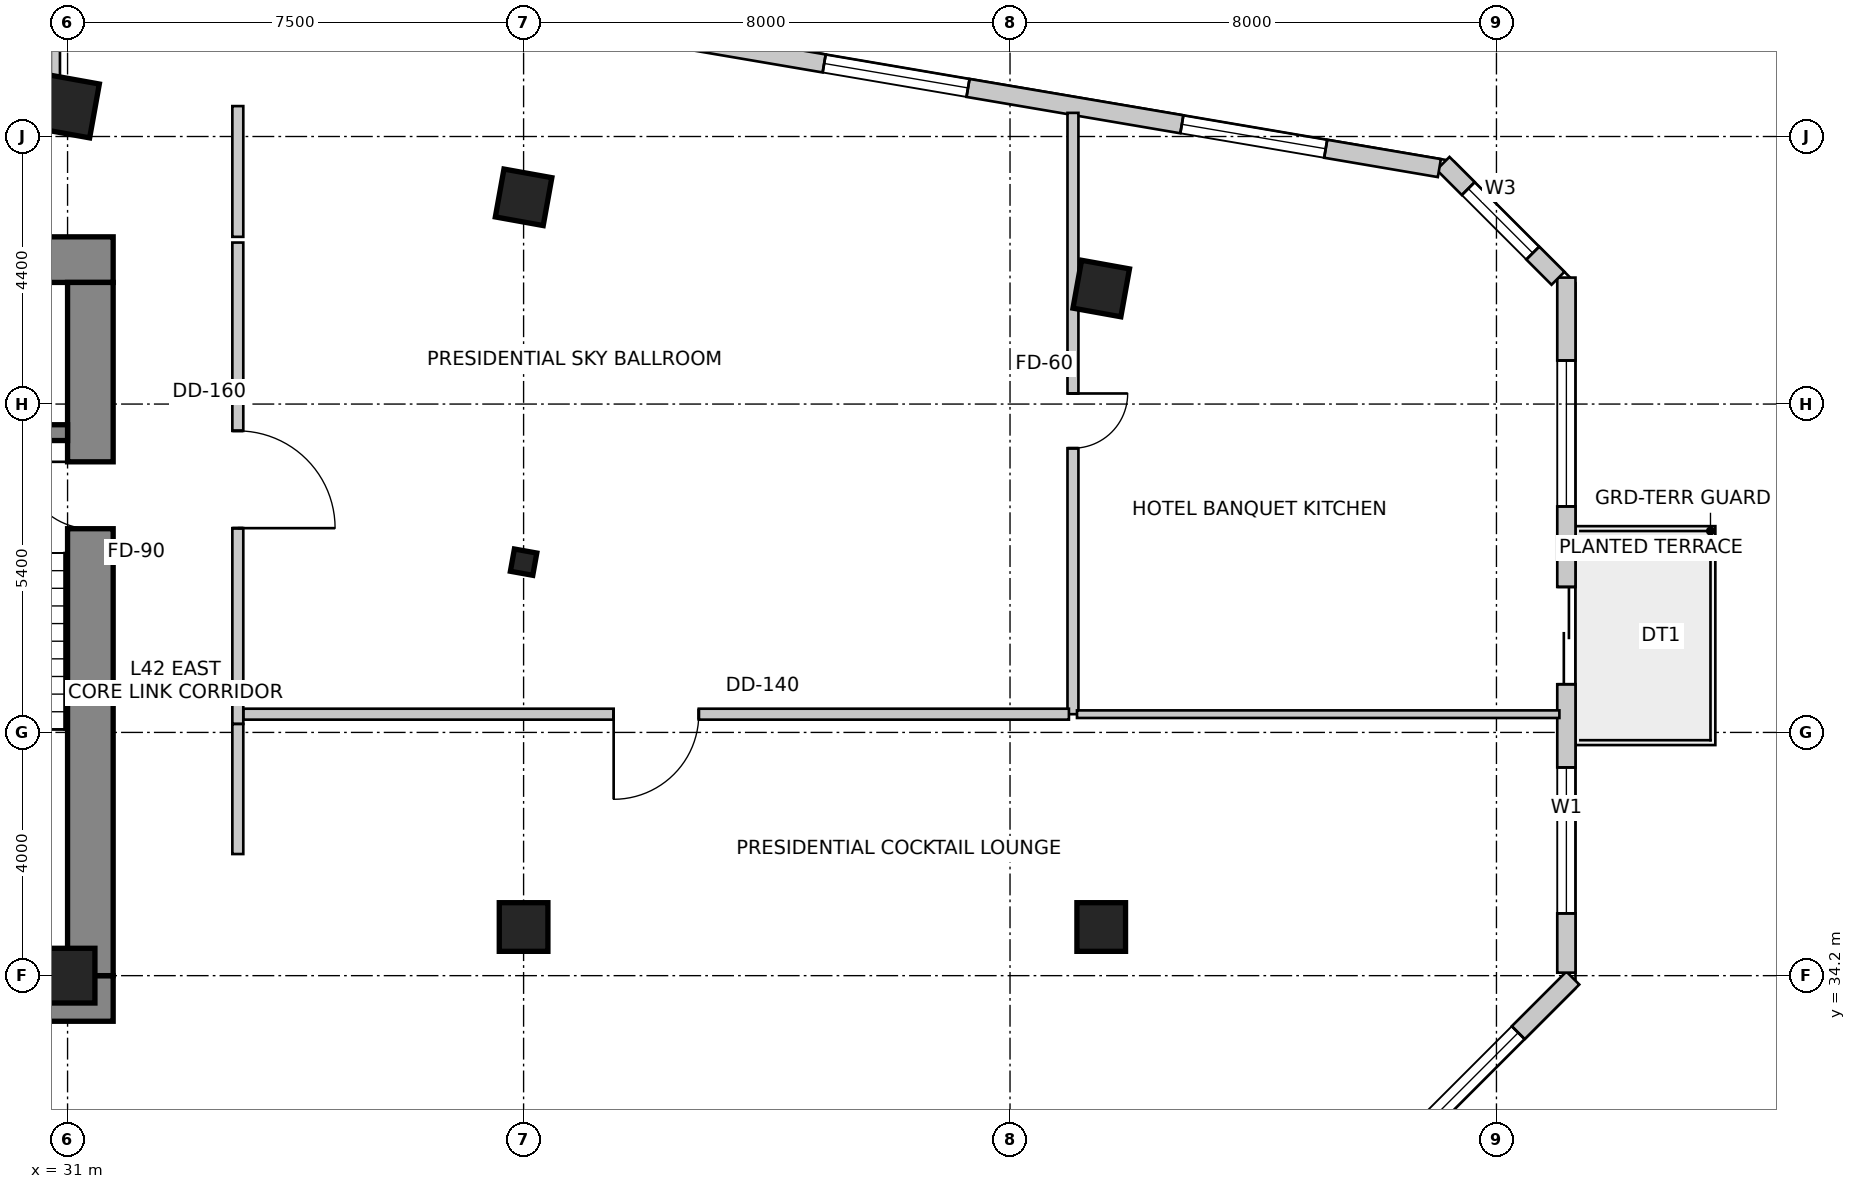
"""IFC4 building model, lengths in metres.
Left out: names, types, materials, properties, quantities, classifications, styles, units other than length and angle.
Written with IfcOpenShell. Run it as: python <this file> out.ifc"""

import sys

from ifc_helpers import new_model, si_unit, direction, frame, frame_2d, origin, origin_2d, place, context, subcontext, project, spatial, rectangle, i_section, extrude, source, transform, mapped, element, fill, save


model = new_model("IFC4")
c1 = context("Model", 3, precision=1e-05, world=origin(), true_north=direction((0.0, 1.0)))
c2 = subcontext(c1, "Body", "Model", "MODEL_VIEW")
j1 = project(units=[si_unit("LENGTHUNIT", "METRE"), si_unit("PLANEANGLEUNIT", "RADIAN")], contexts=[c1])
p1 = place(None, origin())
s1 = spatial("IfcSite", under=j1, at=p1, CompositionType="ELEMENT")
p2 = place(p1, origin())
s2 = spatial("IfcBuilding", under=s1, at=p2, CompositionType="ELEMENT")
p3 = place(p2, frame((0.0, 0.0, 168.2)))
s3 = spatial("IfcBuildingStorey", under=s2, at=p3, CompositionType="ELEMENT", Elevation=168.2)
p4 = place(p3, frame((15.85, 45.975, 0.0), z_axis=(0.0, 0.0, 1.0), x_axis=(1.0, 0.0, 0.0)))
e1 = element("IfcWall", 1, at=p4, inside=s3, PredefinedType="SHEAR", context=c2, shape_type="SweptSolid", body=[
    extrude(rectangle(XDim=15.9, YDim=0.75, at=frame_2d((7.95, 0.0))), origin(), (0.0, 0.0, 1.0), 3.6),
])
p5 = place(p3, frame((15.85, 33.825, 0.0), z_axis=(0.0, 0.0, 1.0), x_axis=(1.0, 0.0, 0.0)))
e2 = element("IfcWall", 2, at=p5, inside=s3, PredefinedType="SHEAR", context=c2, shape_type="SweptSolid", body=[
    extrude(rectangle(XDim=15.9, YDim=0.75, at=frame_2d((7.95, 0.0))), origin(), (0.0, 0.0, 1.0), 3.6),
])
m1 = source(origin(), c2, "Body", "SweptSolid", [
    extrude(rectangle(XDim=1.3, YDim=2.15, at=frame_2d((0.65, 1.075))), frame((0.0, 0.385, 0.0), z_axis=(0.0, -1.0, 0.0), x_axis=(1.0, 0.0, 0.0)), (0.0, 0.0, 1.0), 0.77),
])
p6 = place(p5, frame((10.08, 0.0, 0.0)))
e3 = element("IfcOpeningElement", 3, at=p6, cuts=e2, PredefinedType="OPENING", context=c2, shape_type="MappedRepresentation", body=[
    mapped(m1, transform((0.0, 0.0, 0.0), scale=1.0)),
])
p7 = place(p3, frame((31.375, 34.2, 0.0), z_axis=(0.0, 0.0, 1.0), x_axis=(0.0, 1.0, 0.0)))
e4 = element("IfcWall", 4, at=p7, inside=s3, PredefinedType="SHEAR", context=c2, shape_type="SweptSolid", body=[
    extrude(rectangle(XDim=11.4, YDim=0.75, at=frame_2d((5.7, 0.0))), origin(), (0.0, 0.0, 1.0), 3.6),
])
m2 = source(origin(), c2, "Body", "SweptSolid", [
    extrude(rectangle(XDim=1.1, YDim=2.15, at=frame_2d((0.55, 1.075))), frame((0.0, 0.385, 0.0), z_axis=(0.0, -1.0, 0.0), x_axis=(1.0, 0.0, 0.0)), (0.0, 0.0, 1.0), 0.77),
])
p8 = place(p7, frame((7.35, 0.0, 0.0)))
e5 = element("IfcOpeningElement", 5, at=p8, cuts=e4, PredefinedType="OPENING", context=c2, shape_type="MappedRepresentation", body=[
    mapped(m2, transform((0.0, 0.0, 0.0), scale=1.0)),
])
p9 = place(p3, frame((27.5, 43.13, 0.0), z_axis=(0.0, 0.0, 1.0), x_axis=(1.0, 0.0, 0.0)))
e6 = element("IfcWall", 6, at=p9, inside=s3, PredefinedType="SHEAR", context=c2, shape_type="SweptSolid", body=[
    extrude(rectangle(XDim=3.5, YDim=0.26, at=frame_2d((1.75, 0.0))), origin(), (0.0, 0.0, 1.0), 3.6),
])
m3 = source(origin(), c2, "Body", "SweptSolid", [
    extrude(rectangle(XDim=0.9, YDim=0.9, at=origin_2d()), origin(), (0.0, 0.0, 1.0), 3.6),
])
p10 = place(p3, frame((31.0, 48.5, 0.0), z_axis=(0.0, 0.0, 1.0), x_axis=(0.984195607969, -0.17708474032, 0.0)))
e7 = element("IfcColumn", 7, at=p10, inside=s3, PredefinedType="COLUMN", context=c2, shape_type="MappedRepresentation", body=[
    mapped(m3, transform((0.0, 0.0, 0.0), scale=1.0)),
])
m4 = source(origin(), c2, "Body", "SweptSolid", [
    extrude(rectangle(XDim=0.8, YDim=0.8, at=origin_2d()), origin(), (0.0, 0.0, 1.0), 3.6),
])
for number, where, z_axis, x_axis in (
    (8, (38.5, 47.0, 0.0), (0.0, 0.0, 1.0), (0.984, -0.177, 0.0)),
    (9, (48.0, 45.5, 0.0), (0.0, 0.0, 1.0), (0.984, -0.177, 0.0)),
):
    element("IfcColumn", number, at=place(p3, frame(where, z_axis=z_axis, x_axis=x_axis)), inside=s3, PredefinedType="COLUMN", context=c2, shape_type="MappedRepresentation", body=[
        mapped(m4, transform((0.0, 0.0, 0.0), scale=1.0)),
    ])
p11 = place(p3, frame((31.0, 34.2, 0.0), z_axis=(0.0, 0.0, 1.0), x_axis=(1.0, 0.0, 0.0)))
e10 = element("IfcColumn", 10, at=p11, inside=s3, PredefinedType="COLUMN", context=c2, shape_type="MappedRepresentation", body=[
    mapped(m3, transform((0.0, 0.0, 0.0), scale=1.0)),
])
for number, where, z_axis, x_axis in (
    (11, (38.5, 35.0, 0.0), (0.0, 0.0, 1.0), (1.0, 0.0, 0.0)),
    (12, (48.0, 35.0, 0.0), (0.0, 0.0, 1.0), (1.0, 0.0, 0.0)),
):
    element("IfcColumn", number, at=place(p3, frame(where, z_axis=z_axis, x_axis=x_axis)), inside=s3, PredefinedType="COLUMN", context=c2, shape_type="MappedRepresentation", body=[
        mapped(m4, transform((0.0, 0.0, 0.0), scale=1.0)),
    ])
m5 = source(origin(), c2, "Body", "SweptSolid", [
    extrude(i_section(OverallWidth=0.374, OverallDepth=0.372, WebThickness=0.016, FlangeThickness=0.026, FilletRadius=0.015, at=origin_2d()), origin(), (0.0, 0.0, 1.0), 3.6),
])
p12 = place(p3, frame((38.5, 41.0, 0.0), z_axis=(0.0, 0.0, 1.0), x_axis=(0.984195607969, -0.17708474032, 0.0)))
e13 = element("IfcColumn", 13, at=p12, inside=s3, PredefinedType="COLUMN", context=c2, shape_type="MappedRepresentation", body=[
    mapped(m5, transform((0.0, 0.0, 0.0), scale=1.0)),
])
p13 = place(p3, frame((52.476, 30.88, 0.0), z_axis=(0.0, 0.0, 1.0), x_axis=(0.707106781187, 0.707106781187, 0.0)))
e14 = element("IfcWall", 14, at=p13, inside=s3, PredefinedType="SOLIDWALL", context=c2, shape_type="SweptSolid", body=[
    extrude(rectangle(XDim=4.639, YDim=0.3, at=frame_2d((2.319, 0.0))), origin(), (0.0, 0.0, 1.0), 3.3),
])
m6 = source(origin(), c2, "Body", "SweptSolid", [
    extrude(rectangle(XDim=2.1, YDim=2.0, at=frame_2d((1.05, 1.0))), frame((0.0, 0.16, 0.0), z_axis=(0.0, -1.0, 0.0), x_axis=(1.0, 0.0, 0.0)), (0.0, 0.0, 1.0), 0.32),
])
p14 = place(p13, frame((1.269, 0.0, 0.85)))
e15 = element("IfcOpeningElement", 15, at=p14, cuts=e14, PredefinedType="OPENING", context=c2, shape_type="MappedRepresentation", body=[
    mapped(m6, transform((0.0, 0.0, 0.0), scale=1.0)),
])
p15 = place(p3, frame((55.65, 34.249, 0.0), z_axis=(0.0, 0.0, 1.0), x_axis=(0.0, 1.0, 0.0)))
e16 = element("IfcWall", 16, at=p15, inside=s3, PredefinedType="SOLIDWALL", context=c2, shape_type="SweptSolid", body=[
    extrude(rectangle(XDim=11.431, YDim=0.3, at=frame_2d((5.715, 0.0))), origin(), (0.0, 0.0, 1.0), 3.3),
])
m7 = source(origin(), c2, "Body", "SweptSolid", [
    extrude(rectangle(XDim=1.6, YDim=2.15, at=frame_2d((0.8, 1.075))), frame((0.0, 0.16, 0.0), z_axis=(0.0, -1.0, 0.0), x_axis=(1.0, 0.0, 0.0)), (0.0, 0.0, 1.0), 0.32),
])
p16 = place(p15, frame((4.743, 0.0, 0.0)))
e17 = element("IfcOpeningElement", 17, at=p16, cuts=e16, PredefinedType="OPENING", context=c2, shape_type="MappedRepresentation", body=[
    mapped(m7, transform((0.0, 0.0, 0.0), scale=1.0)),
])
m8 = source(origin(), c2, "Body", "SweptSolid", [
    extrude(rectangle(XDim=2.4, YDim=2.2, at=frame_2d((1.2, 1.1))), frame((0.0, 0.16, 0.0), z_axis=(0.0, -1.0, 0.0), x_axis=(1.0, 0.0, 0.0)), (0.0, 0.0, 1.0), 0.32),
])
p17 = place(p15, frame((0.975, 0.0, 0.85)))
e18 = element("IfcOpeningElement", 18, at=p17, cuts=e16, PredefinedType="OPENING", context=c2, shape_type="MappedRepresentation", body=[
    mapped(m8, transform((0.0, 0.0, 0.0), scale=1.0)),
])
p18 = place(p15, frame((7.667, 0.0, 0.85)))
e19 = element("IfcOpeningElement", 19, at=p18, cuts=e16, PredefinedType="OPENING", context=c2, shape_type="MappedRepresentation", body=[
    mapped(m8, transform((0.0, 0.0, 0.0), scale=1.0)),
])
p19 = place(p3, frame((55.512, 45.668, 0.0), z_axis=(0.0, 0.0, 1.0), x_axis=(-0.707152443695, 0.707061115729, 0.0)))
e20 = element("IfcWall", 20, at=p19, inside=s3, PredefinedType="SOLIDWALL", context=c2, shape_type="SweptSolid", body=[
    extrude(rectangle(XDim=2.673, YDim=0.3, at=frame_2d((1.337, 0.0))), origin(), (0.0, 0.0, 1.0), 3.3),
])
m9 = source(origin(), c2, "Body", "SweptSolid", [
    extrude(rectangle(XDim=1.5, YDim=1.8, at=frame_2d((0.75, 0.9))), frame((0.0, 0.16, 0.0), z_axis=(0.0, -1.0, 0.0), x_axis=(1.0, 0.0, 0.0)), (0.0, 0.0, 1.0), 0.32),
])
p20 = place(p19, frame((0.587, 0.0, 0.85)))
e21 = element("IfcOpeningElement", 21, at=p20, cuts=e20, PredefinedType="OPENING", context=c2, shape_type="MappedRepresentation", body=[
    mapped(m9, transform((0.0, 0.0, 0.0), scale=1.0)),
])
p21 = place(p3, frame((53.561, 47.48, 0.0), z_axis=(0.0, 0.0, 1.0), x_axis=(-0.985845173895, 0.167658262868, 0.0)))
e22 = element("IfcWall", 22, at=p21, inside=s3, PredefinedType="SOLIDWALL", context=c2, shape_type="SweptSolid", body=[
    extrude(rectangle(XDim=32.132, YDim=0.3, at=frame_2d((16.066, 0.0))), origin(), (0.0, 0.0, 1.0), 3.3),
])
p22 = place(p21, frame((1.896, 0.0, 0.85)))
e23 = element("IfcOpeningElement", 23, at=p22, cuts=e22, PredefinedType="OPENING", context=c2, shape_type="MappedRepresentation", body=[
    mapped(m8, transform((0.0, 0.0, 0.0), scale=1.0)),
])
p23 = place(p21, frame((7.863, 0.0, 0.85)))
e24 = element("IfcOpeningElement", 24, at=p23, cuts=e22, PredefinedType="OPENING", context=c2, shape_type="MappedRepresentation", body=[
    mapped(m8, transform((0.0, 0.0, 0.0), scale=1.0)),
])
p24 = place(p21, frame((13.512, 0.0, 0.85)))
e25 = element("IfcOpeningElement", 25, at=p24, cuts=e22, PredefinedType="OPENING", context=c2, shape_type="MappedRepresentation", body=[
    mapped(m6, transform((0.0, 0.0, 0.0), scale=1.0)),
])
p25 = place(p21, frame((18.861, 0.0, 0.85)))
e26 = element("IfcOpeningElement", 26, at=p25, cuts=e22, PredefinedType="OPENING", context=c2, shape_type="MappedRepresentation", body=[
    mapped(m8, transform((0.0, 0.0, 0.0), scale=1.0)),
])
p26 = place(p21, frame((25.4, 0.0, 0.85)))
e27 = element("IfcOpeningElement", 27, at=p26, cuts=e22, PredefinedType="OPENING", context=c2, shape_type="MappedRepresentation", body=[
    mapped(m8, transform((0.0, 0.0, 0.0), scale=1.0)),
])
m10 = source(origin(), c2, "Body", "SweptSolid", [
    extrude(rectangle(XDim=1.2, YDim=1.6, at=frame_2d((0.6, 0.8))), frame((0.0, 0.16, 0.0), z_axis=(0.0, -1.0, 0.0), x_axis=(1.0, 0.0, 0.0)), (0.0, 0.0, 1.0), 0.32),
])
p27 = place(p21, frame((30.5, 0.0, 0.85)))
e28 = element("IfcOpeningElement", 28, at=p27, cuts=e22, PredefinedType="OPENING", context=c2, shape_type="MappedRepresentation", body=[
    mapped(m10, transform((0.0, 0.0, 0.0), scale=1.0)),
])
p28 = place(p3, frame((23.962, 48.5, 0.0), z_axis=(0.0, 0.0, 1.0), x_axis=(1.0, 0.0, 0.0)))
e29 = element("IfcWall", 29, at=p28, inside=s3, PredefinedType="PARTITIONING", context=c2, shape_type="SweptSolid", body=[
    extrude(rectangle(XDim=6.998, YDim=0.18, at=frame_2d((3.499, 0.0))), origin(), (0.0, 0.0, 1.0), 2.442),
])
m11 = source(origin(), c2, "Body", "SweptSolid", [
    extrude(rectangle(XDim=0.85, YDim=2.15, at=frame_2d((0.425, 1.075))), frame((0.0, 0.1, 0.0), z_axis=(0.0, -1.0, 0.0), x_axis=(1.0, 0.0, 0.0)), (0.0, 0.0, 1.0), 0.2),
])
p29 = place(p28, frame((3.074, 0.0, 0.0)))
e30 = element("IfcOpeningElement", 30, at=p29, cuts=e29, PredefinedType="OPENING", context=c2, shape_type="MappedRepresentation", body=[
    mapped(m11, transform((0.0, 0.0, 0.0), scale=1.0)),
])
p30 = place(p3, frame((33.8, 48.5, 0.0), z_axis=(0.0, 0.0, 1.0), x_axis=(0.0, -1.0, 0.0)))
e31 = element("IfcWall", 31, at=p30, inside=s3, PredefinedType="PARTITIONING", context=c2, shape_type="SweptSolid", body=[
    extrude(rectangle(XDim=2.15, YDim=0.18, at=frame_2d((1.075, 0.0))), origin(), (0.0, 0.0, 1.0), 2.442),
])
p31 = place(p3, frame((33.8, 46.256, 0.0), z_axis=(0.0, 0.0, 1.0), x_axis=(0.0, -1.0, 0.0)))
e32 = element("IfcWall", 32, at=p31, inside=s3, PredefinedType="PARTITIONING", context=c2, shape_type="SweptSolid", body=[
    extrude(rectangle(XDim=7.916, YDim=0.18, at=frame_2d((3.958, 0.0))), origin(), (0.0, 0.0, 1.0), 2.738),
])
m12 = source(origin(), c2, "Body", "SweptSolid", [
    extrude(rectangle(XDim=1.6, YDim=2.15, at=frame_2d((0.8, 1.075))), frame((0.0, 0.1, 0.0), z_axis=(0.0, -1.0, 0.0), x_axis=(1.0, 0.0, 0.0)), (0.0, 0.0, 1.0), 0.2),
])
p32 = place(p31, frame((3.097, 0.0, 0.0)))
e33 = element("IfcOpeningElement", 33, at=p32, cuts=e32, PredefinedType="OPENING", context=c2, shape_type="MappedRepresentation", body=[
    mapped(m12, transform((0.0, 0.0, 0.0), scale=1.0)),
])
p33 = place(p3, frame((33.8, 38.338, 0.0), z_axis=(0.0, 0.0, 1.0), x_axis=(0.0, -1.0, 0.0)))
e34 = element("IfcWall", 34, at=p33, inside=s3, PredefinedType="PARTITIONING", context=c2, shape_type="SweptSolid", body=[
    extrude(rectangle(XDim=2.138, YDim=0.18, at=frame_2d((1.069, 0.0))), origin(), (0.0, 0.0, 1.0), 3.3),
])
p34 = place(p3, frame((47.535, 48.389, 0.0), z_axis=(0.0, 0.0, 1.0), x_axis=(0.0, -1.0, 0.0)))
e35 = element("IfcWall", 35, at=p34, inside=s3, PredefinedType="PARTITIONING", context=c2, shape_type="SweptSolid", body=[
    extrude(rectangle(XDim=9.889, YDim=0.18, at=frame_2d((4.944, 0.0))), origin(), (0.0, 0.0, 1.0), 2.442),
])
m13 = source(origin(), c2, "Body", "SweptSolid", [
    extrude(rectangle(XDim=0.9, YDim=2.15, at=frame_2d((0.45, 1.075))), frame((0.0, 0.1, 0.0), z_axis=(0.0, -1.0, 0.0), x_axis=(1.0, 0.0, 0.0)), (0.0, 0.0, 1.0), 0.2),
])
p35 = place(p34, frame((4.615, 0.0, 0.0)))
e36 = element("IfcOpeningElement", 36, at=p35, cuts=e35, PredefinedType="OPENING", context=c2, shape_type="MappedRepresentation", body=[
    mapped(m13, transform((0.0, 0.0, 0.0), scale=1.0)),
])
p36 = place(p3, frame((47.469, 38.5, 0.0), z_axis=(0.0, 0.0, 1.0), x_axis=(-1.0, 0.0, 0.0)))
e37 = element("IfcWall", 37, at=p36, inside=s3, PredefinedType="PARTITIONING", context=c2, shape_type="SweptSolid", body=[
    extrude(rectangle(XDim=13.574, YDim=0.18, at=frame_2d((6.787, 0.0))), origin(), (0.0, 0.0, 1.0), 2.738),
])
m14 = source(origin(), c2, "Body", "SweptSolid", [
    extrude(rectangle(XDim=1.4, YDim=2.15, at=frame_2d((0.7, 1.075))), frame((0.0, 0.1, 0.0), z_axis=(0.0, -1.0, 0.0), x_axis=(1.0, 0.0, 0.0)), (0.0, 0.0, 1.0), 0.2),
])
p37 = place(p36, frame((6.087, 0.0, 0.0)))
e38 = element("IfcOpeningElement", 38, at=p37, cuts=e37, PredefinedType="OPENING", context=c2, shape_type="MappedRepresentation", body=[
    mapped(m14, transform((0.0, 0.0, 0.0), scale=1.0)),
])
p38 = place(p3, frame((55.535, 38.5, 0.0), z_axis=(0.0, 0.0, 1.0), x_axis=(-1.0, 0.0, 0.0)))
e39 = element("IfcWall", 39, at=p38, inside=s3, PredefinedType="PARTITIONING", context=c2, shape_type="SweptSolid", body=[
    extrude(rectangle(XDim=7.933, YDim=0.125, at=frame_2d((3.967, 0.0))), origin(), (0.0, 0.0, 1.0), 2.753),
])
p39 = place(p3, frame((30.8, 51.011, 0.0), z_axis=(0.0, 0.0, 1.0), x_axis=(0.0, -1.0, 0.0)))
e40 = element("IfcWall", 40, at=p39, inside=s3, PredefinedType="PARTITIONING", context=c2, shape_type="SweptSolid", body=[
    extrude(rectangle(XDim=2.292, YDim=0.15, at=frame_2d((1.146, 0.0))), origin(), (0.0, 0.0, 1.0), 3.3),
])
m15 = source(origin(), c2, "Body", "SweptSolid", [
    extrude(rectangle(XDim=2.1, YDim=2.0, at=frame_2d((1.05, 1.0))), frame((0.0, -0.015, 0.0), z_axis=(0.0, -1.0, 0.0), x_axis=(1.0, 0.0, 0.0)), (0.0, 0.0, 1.0), 0.06),
])
p40 = place(p14, origin())
e41 = element("IfcWindow", 41, at=p40, inside=s3, PartitioningType="SINGLE_PANEL", PredefinedType="WINDOW", context=c2, shape_type="MappedRepresentation", body=[
    mapped(m15, transform((0.0, 0.0, 0.0), scale=1.0)),
])
fill(e15, e41)
m16 = source(origin(), c2, "Body", "SweptSolid", [
    extrude(rectangle(XDim=1.6, YDim=2.15, at=frame_2d((0.8, 1.075))), frame((0.0, 0.025, 0.0), z_axis=(0.0, -1.0, 0.0), x_axis=(1.0, 0.0, 0.0)), (0.0, 0.0, 1.0), 0.05),
])
p41 = place(p16, origin())
e42 = element("IfcDoor", 42, at=p41, inside=s3, OperationType="DOUBLE_DOOR_SLIDING", PredefinedType="DOOR", context=c2, shape_type="MappedRepresentation", body=[
    mapped(m16, transform((0.0, 0.0, 0.0), scale=1.0)),
])
fill(e17, e42)
m17 = source(origin(), c2, "Body", "SweptSolid", [
    extrude(rectangle(XDim=2.4, YDim=2.2, at=frame_2d((1.2, 1.1))), frame((0.0, -0.015, 0.0), z_axis=(0.0, -1.0, 0.0), x_axis=(1.0, 0.0, 0.0)), (0.0, 0.0, 1.0), 0.06),
])
p42 = place(p17, origin())
e43 = element("IfcWindow", 43, at=p42, inside=s3, PartitioningType="SINGLE_PANEL", PredefinedType="WINDOW", context=c2, shape_type="MappedRepresentation", body=[
    mapped(m17, transform((0.0, 0.0, 0.0), scale=1.0)),
])
fill(e18, e43)
p43 = place(p18, origin())
e44 = element("IfcWindow", 44, at=p43, inside=s3, PartitioningType="SINGLE_PANEL", PredefinedType="WINDOW", context=c2, shape_type="MappedRepresentation", body=[
    mapped(m17, transform((0.0, 0.0, 0.0), scale=1.0)),
])
fill(e19, e44)
m18 = source(origin(), c2, "Body", "SweptSolid", [
    extrude(rectangle(XDim=1.5, YDim=1.8, at=frame_2d((0.75, 0.9))), frame((0.0, -0.015, 0.0), z_axis=(0.0, -1.0, 0.0), x_axis=(1.0, 0.0, 0.0)), (0.0, 0.0, 1.0), 0.06),
])
p44 = place(p20, origin())
e45 = element("IfcWindow", 45, at=p44, inside=s3, PartitioningType="SINGLE_PANEL", PredefinedType="WINDOW", context=c2, shape_type="MappedRepresentation", body=[
    mapped(m18, transform((0.0, 0.0, 0.0), scale=1.0)),
])
fill(e21, e45)
p45 = place(p22, origin())
e46 = element("IfcWindow", 46, at=p45, inside=s3, PartitioningType="SINGLE_PANEL", PredefinedType="WINDOW", context=c2, shape_type="MappedRepresentation", body=[
    mapped(m17, transform((0.0, 0.0, 0.0), scale=1.0)),
])
fill(e23, e46)
p46 = place(p23, origin())
e47 = element("IfcWindow", 47, at=p46, inside=s3, PartitioningType="SINGLE_PANEL", PredefinedType="WINDOW", context=c2, shape_type="MappedRepresentation", body=[
    mapped(m17, transform((0.0, 0.0, 0.0), scale=1.0)),
])
fill(e24, e47)
m19 = source(origin(), c2, "Body", "SweptSolid", [
    extrude(rectangle(XDim=1.1, YDim=2.15, at=frame_2d((0.55, 1.075))), frame((0.0, 0.025, 0.0), z_axis=(0.0, -1.0, 0.0), x_axis=(1.0, 0.0, 0.0)), (0.0, 0.0, 1.0), 0.05),
])
p47 = place(p8, origin())
e48 = element("IfcDoor", 48, at=p47, inside=s3, OperationType="SINGLE_SWING_RIGHT", PredefinedType="DOOR", context=c2, shape_type="MappedRepresentation", body=[
    mapped(m19, transform((0.0, 0.0, 0.0), scale=1.0)),
])
fill(e5, e48)
m20 = source(origin(), c2, "Body", "SweptSolid", [
    extrude(rectangle(XDim=1.6, YDim=2.15, at=frame_2d((0.8, 1.075))), frame((0.0, 0.025, 0.0), z_axis=(0.0, -1.0, 0.0), x_axis=(1.0, 0.0, 0.0)), (0.0, 0.0, 1.0), 0.05),
])
p48 = place(p32, origin())
e49 = element("IfcDoor", 49, at=p48, inside=s3, OperationType="SINGLE_SWING_RIGHT", PredefinedType="DOOR", context=c2, shape_type="MappedRepresentation", body=[
    mapped(m20, transform((0.0, 0.0, 0.0), scale=1.0)),
])
fill(e33, e49)
m21 = source(origin(), c2, "Body", "SweptSolid", [
    extrude(rectangle(XDim=0.9, YDim=2.15, at=frame_2d((0.45, 1.075))), frame((0.0, 0.025, 0.0), z_axis=(0.0, -1.0, 0.0), x_axis=(1.0, 0.0, 0.0)), (0.0, 0.0, 1.0), 0.05),
])
p49 = place(p35, origin())
e50 = element("IfcDoor", 50, at=p49, inside=s3, OperationType="SINGLE_SWING_LEFT", PredefinedType="DOOR", context=c2, shape_type="MappedRepresentation", body=[
    mapped(m21, transform((0.0, 0.0, 0.0), scale=1.0)),
])
fill(e36, e50)
m22 = source(origin(), c2, "Body", "SweptSolid", [
    extrude(rectangle(XDim=1.4, YDim=2.15, at=frame_2d((0.7, 1.075))), frame((0.0, 0.025, 0.0), z_axis=(0.0, -1.0, 0.0), x_axis=(1.0, 0.0, 0.0)), (0.0, 0.0, 1.0), 0.05),
])
p50 = place(p37, origin())
e51 = element("IfcDoor", 51, at=p50, inside=s3, OperationType="SINGLE_SWING_RIGHT", PredefinedType="DOOR", context=c2, shape_type="MappedRepresentation", body=[
    mapped(m22, transform((0.0, 0.0, 0.0), scale=1.0)),
])
fill(e38, e51)
save(model, sys.argv[1])
